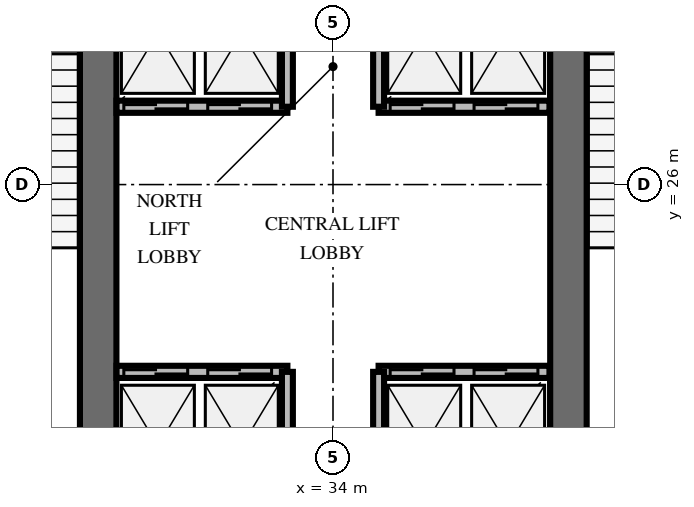
"""IFC4 building model, lengths in metres.
Left out: names, types, materials, properties, quantities, classifications, styles, units other than length and angle.
Written with IfcOpenShell. Run it as: python <this file> out.ifc"""

import sys

from ifc_helpers import new_model, si_unit, direction, frame, frame_2d, origin, place, context, subcontext, project, spatial, rectangle, extrude, element, fill, save


model = new_model("IFC4")
c1 = context("Model", 3, precision=1e-05, world=origin(), true_north=direction((0.0, 1.0)))
c2 = subcontext(c1, "Body", "Model", "MODEL_VIEW")
j1 = project(units=[si_unit("LENGTHUNIT", "METRE"), si_unit("PLANEANGLEUNIT", "RADIAN")], contexts=[c1])
p1 = place(None, origin())
s1 = spatial("IfcSite", under=j1, at=p1, CompositionType="ELEMENT")
p2 = place(p1, origin())
s2 = spatial("IfcBuilding", under=s1, at=p2, CompositionType="ELEMENT")
p3 = place(p2, frame((0.0, 0.0, 153.8)))
s3 = spatial("IfcBuildingStorey", under=s2, at=p3, CompositionType="ELEMENT", Elevation=153.8)
for number, where, z_axis, x_axis in (
    (1, (30.138, 20.187, 0.0), (0.0, 0.0, 1.0), (0.0, 1.0, 0.0)),
    (2, (37.872, 20.187, 0.0), (0.0, 0.0, 1.0), (0.0, 1.0, 0.0)),
):
    element("IfcWall", number, at=place(p3, frame(where, z_axis=z_axis, x_axis=x_axis)), inside=s3, PredefinedType="SHEAR", context=c2, shape_type="SweptSolid", body=[
        extrude(rectangle(XDim=9.826, YDim=0.6, at=frame_2d((4.913, 0.0))), origin(), (0.0, 0.0, 1.0), 4.0),
    ])
p4 = place(p3, frame((30.44, 22.92, 0.0), z_axis=(0.0, 0.0, 1.0), x_axis=(1.0, 0.0, 0.0)))
e3 = element("IfcWall", 3, at=p4, inside=s3, PredefinedType="SOLIDWALL", context=c2, shape_type="SweptSolid", body=[
    extrude(rectangle(XDim=2.81, YDim=0.2, at=frame_2d((1.405, 0.0))), origin(), (0.0, 0.0, 1.0), 2.76),
])
p5 = place(p4, frame((0.12, 0.0, 0.0)))
e4 = element("IfcOpeningElement", 4, at=p5, cuts=e3, PredefinedType="OPENING", context=c2, shape_type="SweptSolid", body=[
    extrude(rectangle(XDim=1.05, YDim=2.1, at=frame_2d((0.525, 1.05))), frame((0.0, 0.11, 0.0), z_axis=(0.0, -1.0, 0.0), x_axis=(1.0, 0.0, 0.0)), (0.0, 0.0, 1.0), 0.22),
])
p6 = place(p4, frame((1.5, 0.0, 0.0)))
e5 = element("IfcOpeningElement", 5, at=p6, cuts=e3, PredefinedType="OPENING", context=c2, shape_type="SweptSolid", body=[
    extrude(rectangle(XDim=1.05, YDim=2.1, at=frame_2d((0.525, 1.05))), frame((0.0, 0.11, 0.0), z_axis=(0.0, -1.0, 0.0), x_axis=(1.0, 0.0, 0.0)), (0.0, 0.0, 1.0), 0.22),
])
p7 = place(p3, frame((33.25, 20.5, 0.0), z_axis=(0.0, 0.0, 1.0), x_axis=(0.0, 1.0, 0.0)))
e6 = element("IfcWall", 6, at=p7, inside=s3, PredefinedType="SOLIDWALL", context=c2, shape_type="SweptSolid", body=[
    extrude(rectangle(XDim=2.42, YDim=0.18, at=frame_2d((1.21, 0.0))), origin(), (0.0, 0.0, 1.0), 2.76),
])
p8 = place(p3, frame((34.75, 22.92, 0.0), z_axis=(0.0, 0.0, 1.0), x_axis=(1.0, 0.0, 0.0)))
e7 = element("IfcWall", 7, at=p8, inside=s3, PredefinedType="SOLIDWALL", context=c2, shape_type="SweptSolid", body=[
    extrude(rectangle(XDim=2.81, YDim=0.2, at=frame_2d((1.405, 0.0))), origin(), (0.0, 0.0, 1.0), 2.76),
])
p9 = place(p8, frame((0.19, 0.0, 0.0)))
e8 = element("IfcOpeningElement", 8, at=p9, cuts=e7, PredefinedType="OPENING", context=c2, shape_type="SweptSolid", body=[
    extrude(rectangle(XDim=1.05, YDim=2.1, at=frame_2d((0.525, 1.05))), frame((0.0, 0.11, 0.0), z_axis=(0.0, -1.0, 0.0), x_axis=(1.0, 0.0, 0.0)), (0.0, 0.0, 1.0), 0.22),
])
p10 = place(p8, frame((1.57, 0.0, 0.0)))
e9 = element("IfcOpeningElement", 9, at=p10, cuts=e7, PredefinedType="OPENING", context=c2, shape_type="SweptSolid", body=[
    extrude(rectangle(XDim=1.05, YDim=2.1, at=frame_2d((0.525, 1.05))), frame((0.0, 0.11, 0.0), z_axis=(0.0, -1.0, 0.0), x_axis=(1.0, 0.0, 0.0)), (0.0, 0.0, 1.0), 0.22),
])
p11 = place(p3, frame((34.75, 20.5, 0.0), z_axis=(0.0, 0.0, 1.0), x_axis=(0.0, 1.0, 0.0)))
e10 = element("IfcWall", 10, at=p11, inside=s3, PredefinedType="SOLIDWALL", context=c2, shape_type="SweptSolid", body=[
    extrude(rectangle(XDim=2.42, YDim=0.18, at=frame_2d((1.21, 0.0))), origin(), (0.0, 0.0, 1.0), 2.76),
])
p12 = place(p3, frame((30.44, 27.28, 0.0), z_axis=(0.0, 0.0, 1.0), x_axis=(1.0, 0.0, 0.0)))
e11 = element("IfcWall", 11, at=p12, inside=s3, PredefinedType="SOLIDWALL", context=c2, shape_type="SweptSolid", body=[
    extrude(rectangle(XDim=2.81, YDim=0.2, at=frame_2d((1.405, 0.0))), origin(), (0.0, 0.0, 1.0), 2.76),
])
p13 = place(p12, frame((0.12, 0.0, 0.0)))
e12 = element("IfcOpeningElement", 12, at=p13, cuts=e11, PredefinedType="OPENING", context=c2, shape_type="SweptSolid", body=[
    extrude(rectangle(XDim=1.05, YDim=2.1, at=frame_2d((0.525, 1.05))), frame((0.0, 0.11, 0.0), z_axis=(0.0, -1.0, 0.0), x_axis=(1.0, 0.0, 0.0)), (0.0, 0.0, 1.0), 0.22),
])
p14 = place(p12, frame((1.5, 0.0, 0.0)))
e13 = element("IfcOpeningElement", 13, at=p14, cuts=e11, PredefinedType="OPENING", context=c2, shape_type="SweptSolid", body=[
    extrude(rectangle(XDim=1.05, YDim=2.1, at=frame_2d((0.525, 1.05))), frame((0.0, 0.11, 0.0), z_axis=(0.0, -1.0, 0.0), x_axis=(1.0, 0.0, 0.0)), (0.0, 0.0, 1.0), 0.22),
])
p15 = place(p3, frame((33.25, 27.28, 0.0), z_axis=(0.0, 0.0, 1.0), x_axis=(0.0, 1.0, 0.0)))
e14 = element("IfcWall", 14, at=p15, inside=s3, PredefinedType="SOLIDWALL", context=c2, shape_type="SweptSolid", body=[
    extrude(rectangle(XDim=2.47, YDim=0.18, at=frame_2d((1.235, 0.0))), origin(), (0.0, 0.0, 1.0), 2.76),
])
p16 = place(p3, frame((34.75, 27.28, 0.0), z_axis=(0.0, 0.0, 1.0), x_axis=(1.0, 0.0, 0.0)))
e15 = element("IfcWall", 15, at=p16, inside=s3, PredefinedType="SOLIDWALL", context=c2, shape_type="SweptSolid", body=[
    extrude(rectangle(XDim=2.81, YDim=0.2, at=frame_2d((1.405, 0.0))), origin(), (0.0, 0.0, 1.0), 2.76),
])
p17 = place(p16, frame((0.19, 0.0, 0.0)))
e16 = element("IfcOpeningElement", 16, at=p17, cuts=e15, PredefinedType="OPENING", context=c2, shape_type="SweptSolid", body=[
    extrude(rectangle(XDim=1.05, YDim=2.1, at=frame_2d((0.525, 1.05))), frame((0.0, 0.11, 0.0), z_axis=(0.0, -1.0, 0.0), x_axis=(1.0, 0.0, 0.0)), (0.0, 0.0, 1.0), 0.22),
])
p18 = place(p16, frame((1.57, 0.0, 0.0)))
e17 = element("IfcOpeningElement", 17, at=p18, cuts=e15, PredefinedType="OPENING", context=c2, shape_type="SweptSolid", body=[
    extrude(rectangle(XDim=1.05, YDim=2.1, at=frame_2d((0.525, 1.05))), frame((0.0, 0.11, 0.0), z_axis=(0.0, -1.0, 0.0), x_axis=(1.0, 0.0, 0.0)), (0.0, 0.0, 1.0), 0.22),
])
p19 = place(p3, frame((34.75, 27.28, 0.0), z_axis=(0.0, 0.0, 1.0), x_axis=(0.0, 1.0, 0.0)))
e18 = element("IfcWall", 18, at=p19, inside=s3, PredefinedType="SOLIDWALL", context=c2, shape_type="SweptSolid", body=[
    extrude(rectangle(XDim=2.47, YDim=0.18, at=frame_2d((1.235, 0.0))), origin(), (0.0, 0.0, 1.0), 2.76),
])
p20 = place(p5, origin())
e19 = element("IfcDoor", 19, at=p20, inside=s3, OperationType="DOUBLE_DOOR_SLIDING", PredefinedType="USERDEFINED", context=c2, shape_type="SweptSolid", body=[
    extrude(rectangle(XDim=1.05, YDim=2.1, at=frame_2d((0.525, 1.05))), frame((0.0, 0.025, 0.0), z_axis=(0.0, -1.0, 0.0), x_axis=(1.0, 0.0, 0.0)), (0.0, 0.0, 1.0), 0.05),
])
fill(e4, e19)
p21 = place(p6, origin())
e20 = element("IfcDoor", 20, at=p21, inside=s3, OperationType="DOUBLE_DOOR_SLIDING", PredefinedType="USERDEFINED", context=c2, shape_type="SweptSolid", body=[
    extrude(rectangle(XDim=1.05, YDim=2.1, at=frame_2d((0.525, 1.05))), frame((0.0, 0.025, 0.0), z_axis=(0.0, -1.0, 0.0), x_axis=(1.0, 0.0, 0.0)), (0.0, 0.0, 1.0), 0.05),
])
fill(e5, e20)
p22 = place(p9, origin())
e21 = element("IfcDoor", 21, at=p22, inside=s3, OperationType="DOUBLE_DOOR_SLIDING", PredefinedType="USERDEFINED", context=c2, shape_type="SweptSolid", body=[
    extrude(rectangle(XDim=1.05, YDim=2.1, at=frame_2d((0.525, 1.05))), frame((0.0, 0.025, 0.0), z_axis=(0.0, -1.0, 0.0), x_axis=(1.0, 0.0, 0.0)), (0.0, 0.0, 1.0), 0.05),
])
fill(e8, e21)
p23 = place(p10, origin())
e22 = element("IfcDoor", 22, at=p23, inside=s3, OperationType="DOUBLE_DOOR_SLIDING", PredefinedType="USERDEFINED", context=c2, shape_type="SweptSolid", body=[
    extrude(rectangle(XDim=1.05, YDim=2.1, at=frame_2d((0.525, 1.05))), frame((0.0, 0.025, 0.0), z_axis=(0.0, -1.0, 0.0), x_axis=(1.0, 0.0, 0.0)), (0.0, 0.0, 1.0), 0.05),
])
fill(e9, e22)
p24 = place(p13, origin())
e23 = element("IfcDoor", 23, at=p24, inside=s3, OperationType="DOUBLE_DOOR_SLIDING", PredefinedType="USERDEFINED", context=c2, shape_type="SweptSolid", body=[
    extrude(rectangle(XDim=1.05, YDim=2.1, at=frame_2d((0.525, 1.05))), frame((0.0, 0.025, 0.0), z_axis=(0.0, -1.0, 0.0), x_axis=(1.0, 0.0, 0.0)), (0.0, 0.0, 1.0), 0.05),
])
fill(e12, e23)
p25 = place(p14, origin())
e24 = element("IfcDoor", 24, at=p25, inside=s3, OperationType="DOUBLE_DOOR_SLIDING", PredefinedType="USERDEFINED", context=c2, shape_type="SweptSolid", body=[
    extrude(rectangle(XDim=1.05, YDim=2.1, at=frame_2d((0.525, 1.05))), frame((0.0, 0.025, 0.0), z_axis=(0.0, -1.0, 0.0), x_axis=(1.0, 0.0, 0.0)), (0.0, 0.0, 1.0), 0.05),
])
fill(e13, e24)
p26 = place(p17, origin())
e25 = element("IfcDoor", 25, at=p26, inside=s3, OperationType="DOUBLE_DOOR_SLIDING", PredefinedType="USERDEFINED", context=c2, shape_type="SweptSolid", body=[
    extrude(rectangle(XDim=1.05, YDim=2.1, at=frame_2d((0.525, 1.05))), frame((0.0, 0.025, 0.0), z_axis=(0.0, -1.0, 0.0), x_axis=(1.0, 0.0, 0.0)), (0.0, 0.0, 1.0), 0.05),
])
fill(e16, e25)
p27 = place(p18, origin())
e26 = element("IfcDoor", 26, at=p27, inside=s3, OperationType="DOUBLE_DOOR_SLIDING", PredefinedType="USERDEFINED", context=c2, shape_type="SweptSolid", body=[
    extrude(rectangle(XDim=1.05, YDim=2.1, at=frame_2d((0.525, 1.05))), frame((0.0, 0.025, 0.0), z_axis=(0.0, -1.0, 0.0), x_axis=(1.0, 0.0, 0.0)), (0.0, 0.0, 1.0), 0.05),
])
fill(e17, e26)
save(model, sys.argv[1])
